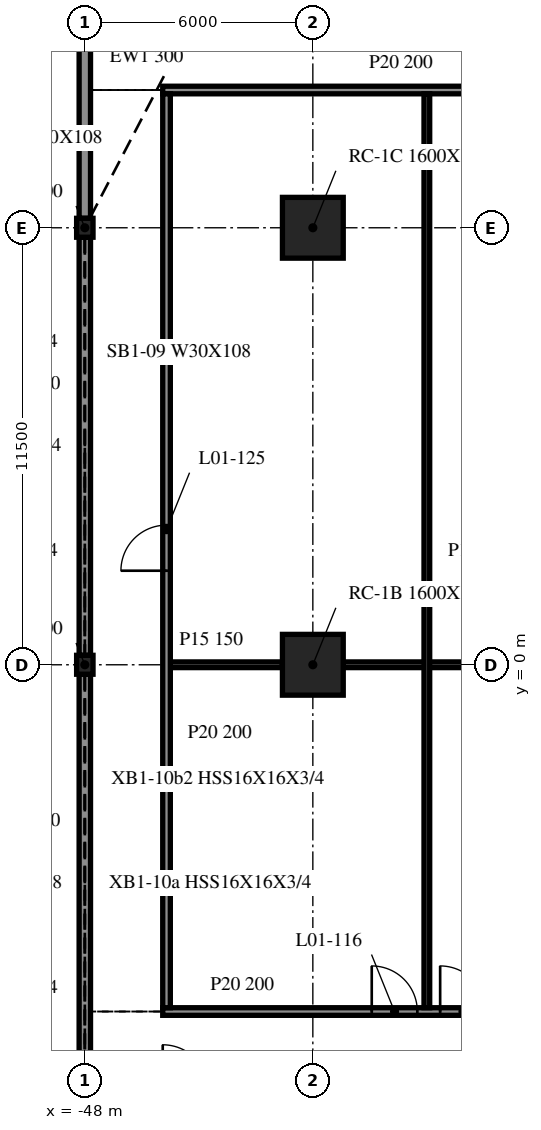
"""IFC4 building model, lengths in metres.
Left out: names, types, materials, properties, quantities, classifications, styles, units other than length and angle.
Written with IfcOpenShell. Run it as: python <this file> out.ifc"""

import sys

from ifc_helpers import new_model, si_unit, direction, frame, frame_2d, origin, origin_2d, place, context, subcontext, project, spatial, rectangle, i_section, extrude, element, fill, save


model = new_model("IFC4")
c1 = context("Model", 3, precision=1e-05, world=origin(), true_north=direction((0.0, 1.0)))
c2 = subcontext(c1, "Body", "Model", "MODEL_VIEW")
j1 = project(units=[si_unit("LENGTHUNIT", "METRE"), si_unit("PLANEANGLEUNIT", "RADIAN")], contexts=[c1])
p1 = place(None, origin())
s1 = spatial("IfcSite", under=j1, at=p1, CompositionType="ELEMENT")
p2 = place(p1, origin())
s2 = spatial("IfcBuilding", under=s1, at=p2, CompositionType="ELEMENT")
p3 = place(p2, frame((0.0, 0.0, 7.2)))
s3 = spatial("IfcBuildingStorey", under=s2, at=p3, CompositionType="ELEMENT", Elevation=7.2)
for number, where, z_axis, x_axis in (
    (1, (-42.0, 0.0, -0.34), (0.0, 0.0, 1.0), (1.0, 0.0, 0.0)),
    (2, (-42.0, 11.5, -0.34), (0.0, 0.0, 1.0), (1.0, 0.0, 0.0)),
):
    element("IfcColumn", number, at=place(p3, frame(where, z_axis=z_axis, x_axis=x_axis)), inside=s3, PredefinedType="COLUMN", context=c2, shape_type="SweptSolid", body=[
        extrude(rectangle(XDim=1.6, YDim=1.6, at=origin_2d()), origin(), (0.0, 0.0, 1.0), 4.3),
    ])
for number, where, z_axis, x_axis in (
    (3, (-48.0, 11.5, -0.34), (0.0, 0.0, 1.0), (1.0, 0.0, 0.0)),
    (4, (-48.0, 0.0, -0.34), (0.0, 0.0, 1.0), (1.0, 0.0, 0.0)),
):
    element("IfcColumn", number, at=place(p3, frame(where, z_axis=z_axis, x_axis=x_axis)), inside=s3, PredefinedType="COLUMN", context=c2, shape_type="SweptSolid", body=[
        extrude(i_section(OverallWidth=0.432, OverallDepth=0.498, WebThickness=0.056, FlangeThickness=0.089, at=origin_2d()), origin(), (0.0, 0.0, 1.0), 4.3),
    ])
p4 = place(p3, frame((-48.0, 17.0, 0.0), z_axis=(0.0, 0.0, 1.0), x_axis=(0.0, -1.0, 0.0)))
e5 = element("IfcWall", 5, at=p4, inside=s3, PredefinedType="NOTDEFINED", context=c2, shape_type="SweptSolid", body=[
    extrude(rectangle(XDim=5.251, YDim=0.3, at=frame_2d((2.625, 0.0))), origin(), (0.0, 0.0, 1.0), 3.203),
])
for number, where, z_axis, x_axis in (
    (6, (-48.0, 11.251, 0.0), (0.0, 0.0, 1.0), (0.0, -1.0, 0.0)),
    (7, (-48.0, -0.249, 0.0), (0.0, 0.0, 1.0), (0.0, -1.0, 0.0)),
):
    element("IfcWall", number, at=place(p3, frame(where, z_axis=z_axis, x_axis=x_axis)), inside=s3, PredefinedType="NOTDEFINED", context=c2, shape_type="SweptSolid", body=[
        extrude(rectangle(XDim=11.002, YDim=0.3, at=frame_2d((5.501, 0.0))), origin(), (0.0, 0.0, 1.0), 3.203),
    ])
p5 = place(p3, frame((-45.95, -9.125, 0.0), z_axis=(0.0, 0.0, 1.0), x_axis=(1.0, 0.0, 0.0)))
e8 = element("IfcWall", 8, at=p5, inside=s3, PredefinedType="PARTITIONING", context=c2, shape_type="SweptSolid", body=[
    extrude(rectangle(XDim=13.95, YDim=0.2, at=frame_2d((6.975, 0.0))), origin(), (0.0, 0.0, 1.0), 3.96),
])
p6 = place(p5, frame((5.5, 0.0, 0.0)))
e9 = element("IfcOpeningElement", 9, at=p6, cuts=e8, PredefinedType="OPENING", context=c2, shape_type="SweptSolid", body=[
    extrude(rectangle(XDim=1.2, YDim=2.1, at=frame_2d((0.6, 1.05))), frame((0.0, 0.11, 0.0), z_axis=(0.0, -1.0, 0.0), x_axis=(1.0, 0.0, 0.0)), (0.0, 0.0, 1.0), 0.22),
])
p7 = place(p5, frame((7.3, 0.0, 0.0)))
e10 = element("IfcOpeningElement", 10, at=p7, cuts=e8, PredefinedType="OPENING", context=c2, shape_type="SweptSolid", body=[
    extrude(rectangle(XDim=1.2, YDim=2.1, at=frame_2d((0.6, 1.05))), frame((0.0, 0.11, 0.0), z_axis=(0.0, -1.0, 0.0), x_axis=(1.0, 0.0, 0.0)), (0.0, 0.0, 1.0), 0.22),
])
p8 = place(p3, frame((-45.75, 0.0, 0.0), z_axis=(0.0, 0.0, 1.0), x_axis=(1.0, 0.0, 0.0)))
e11 = element("IfcWall", 11, at=p8, inside=s3, PredefinedType="PARTITIONING", context=c2, shape_type="SweptSolid", body=[
    extrude(rectangle(XDim=2.95, YDim=0.15, at=frame_2d((1.475, 0.0))), origin(), (0.0, 0.0, 1.0), 3.96),
])
p9 = place(p3, frame((-41.2, 0.0, 0.0), z_axis=(0.0, 0.0, 1.0), x_axis=(1.0, 0.0, 0.0)))
e12 = element("IfcWall", 12, at=p9, inside=s3, PredefinedType="PARTITIONING", context=c2, shape_type="SweptSolid", body=[
    extrude(rectangle(XDim=9.0, YDim=0.15, at=frame_2d((4.5, 0.0))), origin(), (0.0, 0.0, 1.0), 3.96),
])
p10 = place(p3, frame((-45.95, 15.125, 0.0), z_axis=(0.0, 0.0, 1.0), x_axis=(1.0, 0.0, 0.0)))
e13 = element("IfcWall", 13, at=p10, inside=s3, PredefinedType="PARTITIONING", context=c2, shape_type="SweptSolid", body=[
    extrude(rectangle(XDim=13.95, YDim=0.2, at=frame_2d((6.975, 0.0))), origin(), (0.0, 0.0, 1.0), 3.96),
])
p11 = place(p3, frame((-45.85, -9.025, 0.0), z_axis=(0.0, 0.0, 1.0), x_axis=(0.0, 1.0, 0.0)))
e14 = element("IfcWall", 14, at=p11, inside=s3, PredefinedType="PARTITIONING", context=c2, shape_type="SweptSolid", body=[
    extrude(rectangle(XDim=24.05, YDim=0.2, at=frame_2d((12.025, 0.0))), origin(), (0.0, 0.0, 1.0), 3.96),
])
p12 = place(p11, frame((11.5, 0.0, 0.0)))
e15 = element("IfcOpeningElement", 15, at=p12, cuts=e14, PredefinedType="OPENING", context=c2, shape_type="SweptSolid", body=[
    extrude(rectangle(XDim=1.2, YDim=2.1, at=frame_2d((0.6, 1.05))), frame((0.0, 0.11, 0.0), z_axis=(0.0, -1.0, 0.0), x_axis=(1.0, 0.0, 0.0)), (0.0, 0.0, 1.0), 0.22),
])
p13 = place(p3, frame((-39.0, -9.025, 0.0), z_axis=(0.0, 0.0, 1.0), x_axis=(0.0, 1.0, 0.0)))
e16 = element("IfcWall", 16, at=p13, inside=s3, PredefinedType="PARTITIONING", context=c2, shape_type="SweptSolid", body=[
    extrude(rectangle(XDim=24.05, YDim=0.15, at=frame_2d((12.025, 0.0))), origin(), (0.0, 0.0, 1.0), 3.96),
])
p14 = place(p6, origin())
e17 = element("IfcDoor", 17, at=p14, inside=s3, OperationType="SINGLE_SWING_LEFT", PredefinedType="DOOR", context=c2, shape_type="SweptSolid", body=[
    extrude(rectangle(XDim=1.2, YDim=2.1, at=frame_2d((0.6, 1.05))), frame((0.0, 0.025, 0.0), z_axis=(0.0, -1.0, 0.0), x_axis=(1.0, 0.0, 0.0)), (0.0, 0.0, 1.0), 0.05),
])
fill(e9, e17)
p15 = place(p7, origin())
e18 = element("IfcDoor", 18, at=p15, inside=s3, OperationType="SINGLE_SWING_RIGHT", PredefinedType="DOOR", context=c2, shape_type="SweptSolid", body=[
    extrude(rectangle(XDim=1.2, YDim=2.1, at=frame_2d((0.6, 1.05))), frame((0.0, 0.025, 0.0), z_axis=(0.0, -1.0, 0.0), x_axis=(1.0, 0.0, 0.0)), (0.0, 0.0, 1.0), 0.05),
])
fill(e10, e18)
p16 = place(p12, origin())
e19 = element("IfcDoor", 19, at=p16, inside=s3, OperationType="SINGLE_SWING_LEFT", PredefinedType="DOOR", context=c2, shape_type="SweptSolid", body=[
    extrude(rectangle(XDim=1.2, YDim=2.1, at=frame_2d((0.6, 1.05))), frame((0.0, 0.025, 0.0), z_axis=(0.0, -1.0, 0.0), x_axis=(1.0, 0.0, 0.0)), (0.0, 0.0, 1.0), 0.05),
])
fill(e15, e19)
save(model, sys.argv[1])
